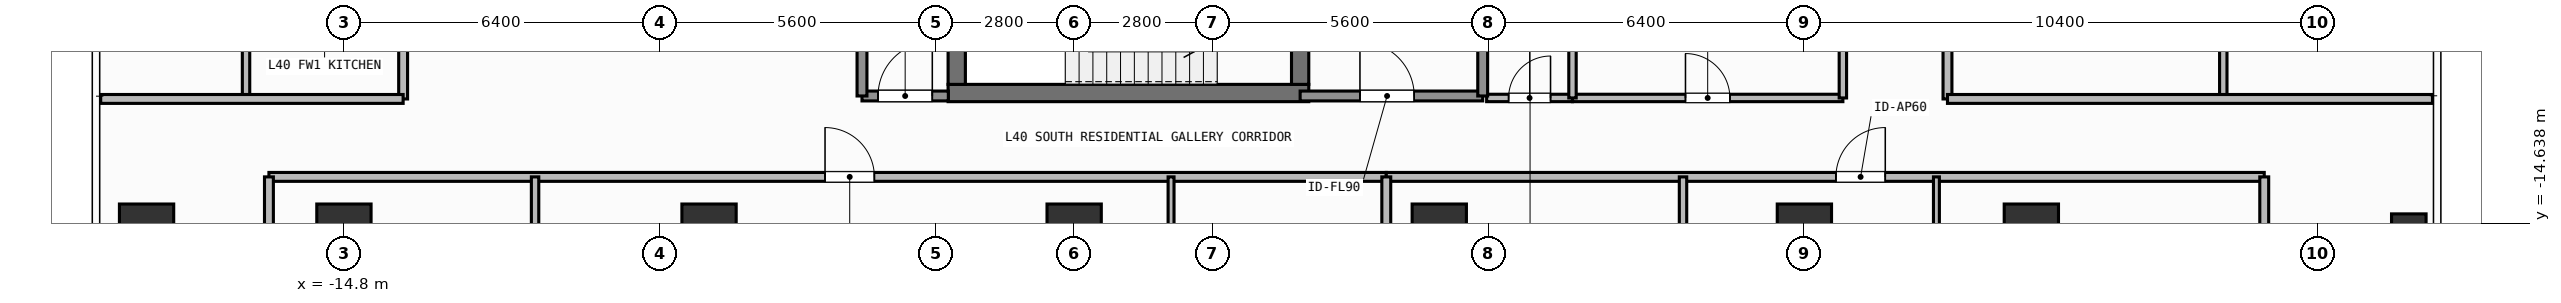
"""IFC4 building model, lengths in metres.
Left out: names, types, materials, properties, quantities, classifications, styles, units other than length and angle.
Written with IfcOpenShell. Run it as: python <this file> out.ifc"""

import sys

from ifc_helpers import new_model, si_unit, direction, frame, frame_2d, origin, origin_2d, place, context, subcontext, project, spatial, rectangle, hollow_rectangle, extrude, element, fill, save


model = new_model("IFC4")
c1 = context("Model", 3, precision=1e-05, world=origin(), true_north=direction((0.0, 1.0)))
c2 = subcontext(c1, "Body", "Model", "MODEL_VIEW")
j1 = project(units=[si_unit("LENGTHUNIT", "METRE"), si_unit("PLANEANGLEUNIT", "RADIAN")], contexts=[c1])
p1 = place(None, origin())
s1 = spatial("IfcSite", under=j1, at=p1, CompositionType="ELEMENT")
p2 = place(p1, origin())
s2 = spatial("IfcBuilding", under=s1, at=p2, CompositionType="ELEMENT")
p3 = place(p2, frame((0.0, 0.0, 164.1)))
s3 = spatial("IfcBuildingStorey", under=s2, at=p3, CompositionType="ELEMENT", Elevation=164.1)
p4 = place(p3, frame((-2.555, -12.0, 0.0), z_axis=(0.0, 0.0, 1.0), x_axis=(1.0, 0.0, 0.0)))
e1 = element("IfcWall", 1, at=p4, inside=s3, PredefinedType="SHEAR", context=c2, shape_type="SweptSolid", body=[
    extrude(rectangle(XDim=7.31, YDim=0.35, at=frame_2d((3.655, 0.0))), origin(), (0.0, 0.0, 1.0), 3.9),
])
p5 = place(p3, frame((-2.38, -11.825, 0.0), z_axis=(0.0, 0.0, 1.0), x_axis=(0.0, 1.0, 0.0)))
e2 = element("IfcWall", 2, at=p5, inside=s3, PredefinedType="SHEAR", context=c2, shape_type="SweptSolid", body=[
    extrude(rectangle(XDim=2.925, YDim=0.35, at=frame_2d((1.462, 0.0))), origin(), (0.0, 0.0, 1.0), 3.9),
])
p6 = place(p3, frame((4.58, -8.9, 0.0), z_axis=(0.0, 0.0, 1.0), x_axis=(0.0, -1.0, 0.0)))
e3 = element("IfcWall", 3, at=p6, inside=s3, PredefinedType="SHEAR", context=c2, shape_type="SweptSolid", body=[
    extrude(rectangle(XDim=2.925, YDim=0.35, at=frame_2d((1.462, 0.0))), origin(), (0.0, 0.0, 1.0), 3.9),
])
p7 = place(p6, frame((0.913, 0.0, 0.0)))
e4 = element("IfcOpeningElement", 4, at=p7, cuts=e3, PredefinedType="OPENING", context=c2, shape_type="SweptSolid", body=[
    extrude(rectangle(XDim=1.1, YDim=2.15, at=frame_2d((0.55, 1.075))), frame((0.0, 0.185, 0.0), z_axis=(0.0, -1.0, 0.0), x_axis=(1.0, 0.0, 0.0)), (0.0, 0.0, 1.0), 0.37),
])
for number, where, z_axis, x_axis in (
    (5, (-14.8, -14.8, 0.0), (0.0, 0.0, 1.0), (1.0, 0.0, 0.0)),
    (6, (-7.4, -14.8, 0.0), (0.0, 0.0, 1.0), (1.0, 0.0, 0.0)),
    (7, (0.0, -14.8, 0.0), (0.0, 0.0, 1.0), (1.0, 0.0, 0.0)),
    (8, (7.4, -14.8, 0.0), (0.0, 0.0, 1.0), (1.0, 0.0, 0.0)),
    (9, (14.8, -14.8, 0.0), (0.0, 0.0, 1.0), (1.0, 0.0, 0.0)),
    (10, (-18.8, -14.8, 0.0), (0.0, 0.0, 1.0), (1.0, 0.0, 0.0)),
    (11, (19.4, -14.8, 0.0), (0.0, 0.0, 1.0), (1.0, 0.0, 0.0)),
):
    element("IfcColumn", number, at=place(p3, frame(where, z_axis=z_axis, x_axis=x_axis)), inside=s3, PredefinedType="COLUMN", context=c2, shape_type="SweptSolid", body=[
        extrude(rectangle(XDim=1.1, YDim=1.1, at=origin_2d()), origin(), (0.0, 0.0, 1.0), 3.9),
    ])
p8 = place(p3, frame((27.05, -14.8, 0.0), z_axis=(0.0, 0.0, 1.0), x_axis=(1.0, 0.0, 0.0)))
e12 = element("IfcColumn", 12, at=p8, inside=s3, PredefinedType="COLUMN", context=c2, shape_type="SweptSolid", body=[
    extrude(hollow_rectangle(XDim=0.7, YDim=0.7, WallThickness=0.032, at=origin_2d()), origin(), (0.0, 0.0, 1.0), 3.9),
])
p9 = place(p3, frame((4.58, -12.06, 0.0), z_axis=(0.0, 0.0, 1.0), x_axis=(1.0, 0.0, 0.0)))
e13 = element("IfcWall", 13, at=p9, inside=s3, PredefinedType="SOLIDWALL", context=c2, shape_type="SweptSolid", body=[
    extrude(rectangle(XDim=3.7, YDim=0.2, at=frame_2d((1.85, 0.0))), origin(), (0.0, 0.0, 1.0), 3.62),
])
p10 = place(p9, frame((1.212, 0.0, 0.0)))
e14 = element("IfcOpeningElement", 14, at=p10, cuts=e13, PredefinedType="OPENING", context=c2, shape_type="SweptSolid", body=[
    extrude(rectangle(XDim=1.1, YDim=2.15, at=frame_2d((0.55, 1.075))), frame((0.0, 0.11, 0.0), z_axis=(0.0, -1.0, 0.0), x_axis=(1.0, 0.0, 0.0)), (0.0, 0.0, 1.0), 0.22),
])
p11 = place(p3, frame((-4.3, -12.06, 0.0), z_axis=(0.0, 0.0, 1.0), x_axis=(1.0, 0.0, 0.0)))
e15 = element("IfcWall", 15, at=p11, inside=s3, PredefinedType="SOLIDWALL", context=c2, shape_type="SweptSolid", body=[
    extrude(rectangle(XDim=1.75, YDim=0.2, at=frame_2d((0.875, 0.0))), origin(), (0.0, 0.0, 1.0), 3.62),
])
p12 = place(p11, frame((0.325, 0.0, 0.0)))
e16 = element("IfcOpeningElement", 16, at=p12, cuts=e15, PredefinedType="OPENING", context=c2, shape_type="SweptSolid", body=[
    extrude(rectangle(XDim=1.1, YDim=2.15, at=frame_2d((0.55, 1.075))), frame((0.0, 0.11, 0.0), z_axis=(0.0, -1.0, 0.0), x_axis=(1.0, 0.0, 0.0)), (0.0, 0.0, 1.0), 0.22),
])
p13 = place(p3, frame((8.36, -12.1, 0.0), z_axis=(0.0, 0.0, 1.0), x_axis=(1.0, 0.0, 0.0)))
e17 = element("IfcWall", 17, at=p13, inside=s3, PredefinedType="PARTITIONING", context=c2, shape_type="SweptSolid", body=[
    extrude(rectangle(XDim=1.74, YDim=0.15, at=frame_2d((0.87, 0.0))), origin(), (0.0, 0.0, 1.0), 3.62),
])
p14 = place(p13, frame((0.445, 0.0, 0.0)))
e18 = element("IfcOpeningElement", 18, at=p14, cuts=e17, PredefinedType="OPENING", context=c2, shape_type="SweptSolid", body=[
    extrude(rectangle(XDim=0.85, YDim=2.1, at=frame_2d((0.425, 1.05))), frame((0.0, 0.085, 0.0), z_axis=(0.0, -1.0, 0.0), x_axis=(1.0, 0.0, 0.0)), (0.0, 0.0, 1.0), 0.17),
])
p15 = place(p3, frame((10.1, -12.1, 0.0), z_axis=(0.0, 0.0, 1.0), x_axis=(1.0, 0.0, 0.0)))
e19 = element("IfcWall", 19, at=p15, inside=s3, PredefinedType="PARTITIONING", context=c2, shape_type="SweptSolid", body=[
    extrude(rectangle(XDim=5.48, YDim=0.15, at=frame_2d((2.74, 0.0))), origin(), (0.0, 0.0, 1.0), 3.62),
])
p16 = place(p15, frame((2.29, 0.0, 0.0)))
e20 = element("IfcOpeningElement", 20, at=p16, cuts=e19, PredefinedType="OPENING", context=c2, shape_type="SweptSolid", body=[
    extrude(rectangle(XDim=0.9, YDim=2.1, at=frame_2d((0.45, 1.05))), frame((0.0, 0.085, 0.0), z_axis=(0.0, -1.0, 0.0), x_axis=(1.0, 0.0, 0.0)), (0.0, 0.0, 1.0), 0.17),
])
p17 = place(p3, frame((-16.32, -13.7, 0.0), z_axis=(0.0, 0.0, 1.0), x_axis=(1.0, 0.0, 0.0)))
e21 = element("IfcWall", 21, at=p17, inside=s3, PredefinedType="PARTITIONING", context=c2, shape_type="SweptSolid", body=[
    extrude(rectangle(XDim=22.646, YDim=0.18, at=frame_2d((11.323, 0.0))), origin(), (0.0, 0.0, 1.0), 3.62),
])
p18 = place(p17, frame((11.271, 0.0, 0.0)))
e22 = element("IfcOpeningElement", 22, at=p18, cuts=e21, PredefinedType="OPENING", context=c2, shape_type="SweptSolid", body=[
    extrude(rectangle(XDim=1.0, YDim=2.2, at=frame_2d((0.5, 1.1))), frame((0.0, 0.1, 0.0), z_axis=(0.0, -1.0, 0.0), x_axis=(1.0, 0.0, 0.0)), (0.0, 0.0, 1.0), 0.2),
])
p19 = place(p3, frame((-10.926, -19.634, 0.0), z_axis=(0.0, 0.0, 1.0), x_axis=(0.0, 1.0, 0.0)))
e23 = element("IfcWall", 23, at=p19, inside=s3, PredefinedType="PARTITIONING", context=c2, shape_type="SweptSolid", body=[
    extrude(rectangle(XDim=5.934, YDim=0.15, at=frame_2d((2.967, 0.0))), origin(), (0.0, 0.0, 1.0), 3.31),
])
p20 = place(p19, frame((2.63, 0.0, 0.0)))
e24 = element("IfcOpeningElement", 24, at=p20, cuts=e23, PredefinedType="OPENING", context=c2, shape_type="SweptSolid", body=[
    extrude(rectangle(XDim=0.85, YDim=2.1, at=frame_2d((0.425, 1.05))), frame((0.0, 0.085, 0.0), z_axis=(0.0, -1.0, 0.0), x_axis=(1.0, 0.0, 0.0)), (0.0, 0.0, 1.0), 0.17),
])
p21 = place(p3, frame((1.964, -17.628, 0.0), z_axis=(0.0, 0.0, 1.0), x_axis=(0.0, 1.0, 0.0)))
e25 = element("IfcWall", 25, at=p21, inside=s3, PredefinedType="PARTITIONING", context=c2, shape_type="SweptSolid", body=[
    extrude(rectangle(XDim=3.928, YDim=0.12, at=frame_2d((1.964, 0.0))), origin(), (0.0, 0.0, 1.0), 3.62),
])
p22 = place(p21, frame((1.367, 0.0, 0.0)))
e26 = element("IfcOpeningElement", 26, at=p22, cuts=e25, PredefinedType="OPENING", context=c2, shape_type="SweptSolid", body=[
    extrude(rectangle(XDim=0.85, YDim=2.1, at=frame_2d((0.425, 1.05))), frame((0.0, 0.07, 0.0), z_axis=(0.0, -1.0, 0.0), x_axis=(1.0, 0.0, 0.0)), (0.0, 0.0, 1.0), 0.14),
])
p23 = place(p3, frame((6.326, -13.7, 0.0), z_axis=(0.0, 0.0, 1.0), x_axis=(1.0, 0.0, 0.0)))
e27 = element("IfcWall", 27, at=p23, inside=s3, PredefinedType="PARTITIONING", context=c2, shape_type="SweptSolid", body=[
    extrude(rectangle(XDim=17.794, YDim=0.18, at=frame_2d((8.897, 0.0))), origin(), (0.0, 0.0, 1.0), 3.62),
])
p24 = place(p23, frame((9.113, 0.0, 0.0)))
e28 = element("IfcOpeningElement", 28, at=p24, cuts=e27, PredefinedType="OPENING", context=c2, shape_type="SweptSolid", body=[
    extrude(rectangle(XDim=1.0, YDim=2.2, at=frame_2d((0.5, 1.1))), frame((0.0, 0.1, 0.0), z_axis=(0.0, -1.0, 0.0), x_axis=(1.0, 0.0, 0.0)), (0.0, 0.0, 1.0), 0.2),
])
p25 = place(p3, frame((12.34, -19.39, 0.0), z_axis=(0.0, 0.0, 1.0), x_axis=(0.0, 1.0, 0.0)))
e29 = element("IfcWall", 29, at=p25, inside=s3, PredefinedType="PARTITIONING", context=c2, shape_type="SweptSolid", body=[
    extrude(rectangle(XDim=5.69, YDim=0.15, at=frame_2d((2.845, 0.0))), origin(), (0.0, 0.0, 1.0), 3.62),
])
p26 = place(p25, frame((2.42, 0.0, 0.0)))
e30 = element("IfcOpeningElement", 30, at=p26, cuts=e29, PredefinedType="OPENING", context=c2, shape_type="SweptSolid", body=[
    extrude(rectangle(XDim=0.85, YDim=2.1, at=frame_2d((0.425, 1.05))), frame((0.0, 0.085, 0.0), z_axis=(0.0, -1.0, 0.0), x_axis=(1.0, 0.0, 0.0)), (0.0, 0.0, 1.0), 0.17),
])
p27 = place(p3, frame((17.476, -17.683, 0.0), z_axis=(0.0, 0.0, 1.0), x_axis=(0.0, 1.0, 0.0)))
e31 = element("IfcWall", 31, at=p27, inside=s3, PredefinedType="PARTITIONING", context=c2, shape_type="SweptSolid", body=[
    extrude(rectangle(XDim=3.983, YDim=0.12, at=frame_2d((1.992, 0.0))), origin(), (0.0, 0.0, 1.0), 3.62),
])
p28 = place(p27, frame((1.391, 0.0, 0.0)))
e32 = element("IfcOpeningElement", 32, at=p28, cuts=e31, PredefinedType="OPENING", context=c2, shape_type="SweptSolid", body=[
    extrude(rectangle(XDim=0.85, YDim=2.1, at=frame_2d((0.425, 1.05))), frame((0.0, 0.07, 0.0), z_axis=(0.0, -1.0, 0.0), x_axis=(1.0, 0.0, 0.0)), (0.0, 0.0, 1.0), 0.14),
])
p29 = place(p3, frame((-13.6, -12.12, 0.0), z_axis=(0.0, 0.0, 1.0), x_axis=(0.0, 1.0, 0.0)))
e33 = element("IfcWall", 33, at=p29, inside=s3, PredefinedType="PARTITIONING", context=c2, shape_type="SweptSolid", body=[
    extrude(rectangle(XDim=10.956, YDim=0.18, at=frame_2d((5.478, 0.0))), origin(), (0.0, 0.0, 1.0), 3.62),
])
p30 = place(p29, frame((5.335, 0.0, 0.0)))
e34 = element("IfcOpeningElement", 34, at=p30, cuts=e33, PredefinedType="OPENING", context=c2, shape_type="SweptSolid", body=[
    extrude(rectangle(XDim=1.0, YDim=2.2, at=frame_2d((0.5, 1.1))), frame((0.0, 0.1, 0.0), z_axis=(0.0, -1.0, 0.0), x_axis=(1.0, 0.0, 0.0)), (0.0, 0.0, 1.0), 0.2),
])
p31 = place(p3, frame((17.7, -12.12, 0.0), z_axis=(0.0, 0.0, 1.0), x_axis=(0.0, 1.0, 0.0)))
e35 = element("IfcWall", 35, at=p31, inside=s3, PredefinedType="PARTITIONING", context=c2, shape_type="SweptSolid", body=[
    extrude(rectangle(XDim=24.24, YDim=0.18, at=frame_2d((12.12, 0.0))), origin(), (0.0, 0.0, 1.0), 3.62),
])
p32 = place(p31, frame((11.62, 0.0, 0.0)))
e36 = element("IfcOpeningElement", 36, at=p32, cuts=e35, PredefinedType="OPENING", context=c2, shape_type="SweptSolid", body=[
    extrude(rectangle(XDim=1.0, YDim=2.2, at=frame_2d((0.5, 1.1))), frame((0.0, 0.1, 0.0), z_axis=(0.0, -1.0, 0.0), x_axis=(1.0, 0.0, 0.0)), (0.0, 0.0, 1.0), 0.2),
])
for number, where, z_axis, x_axis in (
    (37, (8.28, -12.06, 0.0), (0.0, 0.0, 1.0), (0.0, 1.0, 0.0)),
    (38, (-4.3, -12.06, 0.0), (0.0, 0.0, 1.0), (0.0, 1.0, 0.0)),
):
    element("IfcWall", number, at=place(p3, frame(where, z_axis=z_axis, x_axis=x_axis)), inside=s3, PredefinedType="SOLIDWALL", context=c2, shape_type="SweptSolid", body=[
        extrude(rectangle(XDim=3.26, YDim=0.2, at=frame_2d((1.63, 0.0))), origin(), (0.0, 0.0, 1.0), 3.62),
    ])
p33 = place(p3, frame((10.1, -12.1, 0.0), z_axis=(0.0, 0.0, 1.0), x_axis=(0.0, 1.0, 0.0)))
e39 = element("IfcWall", 39, at=p33, inside=s3, PredefinedType="PARTITIONING", context=c2, shape_type="SweptSolid", body=[
    extrude(rectangle(XDim=2.35, YDim=0.15, at=frame_2d((1.175, 0.0))), origin(), (0.0, 0.0, 1.0), 3.62),
])
p34 = place(p3, frame((15.58, -12.1, 0.0), z_axis=(0.0, 0.0, 1.0), x_axis=(0.0, 1.0, 0.0)))
e40 = element("IfcWall", 40, at=p34, inside=s3, PredefinedType="PARTITIONING", context=c2, shape_type="SweptSolid", body=[
    extrude(rectangle(XDim=6.25, YDim=0.15, at=frame_2d((3.125, 0.0))), origin(), (0.0, 0.0, 1.0), 3.62),
])
for number, where, z_axis, x_axis in (
    (41, (-16.32, -22.51, 0.0), (0.0, 0.0, 1.0), (0.0, 1.0, 0.0)),
    (42, (24.12, -22.51, 0.0), (0.0, 0.0, 1.0), (0.0, 1.0, 0.0)),
):
    element("IfcWall", number, at=place(p3, frame(where, z_axis=z_axis, x_axis=x_axis)), inside=s3, PredefinedType="PARTITIONING", context=c2, shape_type="SweptSolid", body=[
        extrude(rectangle(XDim=8.81, YDim=0.18, at=frame_2d((4.405, 0.0))), origin(), (0.0, 0.0, 1.0), 3.62),
    ])
p35 = place(p3, frame((6.326, -23.63, 0.0), z_axis=(0.0, 0.0, 1.0), x_axis=(0.0, 1.0, 0.0)))
e43 = element("IfcWall", 43, at=p35, inside=s3, PredefinedType="PARTITIONING", context=c2, shape_type="SweptSolid", body=[
    extrude(rectangle(XDim=9.93, YDim=0.18, at=frame_2d((4.965, 0.0))), origin(), (0.0, 0.0, 1.0), 3.62),
])
p36 = place(p3, frame((-16.784, -12.12, 0.0), z_axis=(0.0, 0.0, 1.0), x_axis=(0.0, 1.0, 0.0)))
e44 = element("IfcWall", 44, at=p36, inside=s3, PredefinedType="PARTITIONING", context=c2, shape_type="SweptSolid", body=[
    extrude(rectangle(XDim=3.726, YDim=0.15, at=frame_2d((1.863, 0.0))), origin(), (0.0, 0.0, 1.0), 3.62),
])
p37 = place(p3, frame((-19.73, -12.12, 0.0), z_axis=(0.0, 0.0, 1.0), x_axis=(1.0, 0.0, 0.0)))
e45 = element("IfcWall", 45, at=p37, inside=s3, PredefinedType="PARTITIONING", context=c2, shape_type="SweptSolid", body=[
    extrude(rectangle(XDim=6.13, YDim=0.18, at=frame_2d((3.065, 0.0))), origin(), (0.0, 0.0, 1.0), 3.62),
])
p38 = place(p3, frame((23.29, -12.12, 0.0), z_axis=(0.0, 0.0, 1.0), x_axis=(0.0, 1.0, 0.0)))
e46 = element("IfcWall", 46, at=p38, inside=s3, PredefinedType="PARTITIONING", context=c2, shape_type="SweptSolid", body=[
    extrude(rectangle(XDim=6.684, YDim=0.15, at=frame_2d((3.342, 0.0))), origin(), (0.0, 0.0, 1.0), 3.62),
])
p39 = place(p3, frame((17.7, -12.12, 0.0), z_axis=(0.0, 0.0, 1.0), x_axis=(1.0, 0.0, 0.0)))
e47 = element("IfcWall", 47, at=p39, inside=s3, PredefinedType="PARTITIONING", context=c2, shape_type="SweptSolid", body=[
    extrude(rectangle(XDim=9.83, YDim=0.18, at=frame_2d((4.915, 0.0))), origin(), (0.0, 0.0, 1.0), 3.62),
])
p40 = place(p10, origin())
e48 = element("IfcDoor", 48, at=p40, inside=s3, OperationType="SINGLE_SWING_LEFT", PredefinedType="DOOR", context=c2, shape_type="SweptSolid", body=[
    extrude(rectangle(XDim=1.1, YDim=2.15, at=frame_2d((0.55, 1.075))), frame((0.0, 0.025, 0.0), z_axis=(0.0, -1.0, 0.0), x_axis=(1.0, 0.0, 0.0)), (0.0, 0.0, 1.0), 0.05),
])
fill(e14, e48)
p41 = place(p12, origin())
e49 = element("IfcDoor", 49, at=p41, inside=s3, OperationType="SINGLE_SWING_RIGHT", PredefinedType="DOOR", context=c2, shape_type="SweptSolid", body=[
    extrude(rectangle(XDim=1.1, YDim=2.15, at=frame_2d((0.55, 1.075))), frame((0.0, 0.025, 0.0), z_axis=(0.0, -1.0, 0.0), x_axis=(1.0, 0.0, 0.0)), (0.0, 0.0, 1.0), 0.05),
])
fill(e16, e49)
p42 = place(p14, origin())
e50 = element("IfcDoor", 50, at=p42, inside=s3, OperationType="SINGLE_SWING_RIGHT", PredefinedType="DOOR", context=c2, shape_type="SweptSolid", body=[
    extrude(rectangle(XDim=0.85, YDim=2.1, at=frame_2d((0.425, 1.05))), frame((0.0, 0.025, 0.0), z_axis=(0.0, -1.0, 0.0), x_axis=(1.0, 0.0, 0.0)), (0.0, 0.0, 1.0), 0.05),
])
fill(e18, e50)
p43 = place(p16, origin())
e51 = element("IfcDoor", 51, at=p43, inside=s3, OperationType="SINGLE_SWING_LEFT", PredefinedType="DOOR", context=c2, shape_type="SweptSolid", body=[
    extrude(rectangle(XDim=0.9, YDim=2.1, at=frame_2d((0.45, 1.05))), frame((0.0, 0.025, 0.0), z_axis=(0.0, -1.0, 0.0), x_axis=(1.0, 0.0, 0.0)), (0.0, 0.0, 1.0), 0.05),
])
fill(e20, e51)
p44 = place(p18, origin())
e52 = element("IfcDoor", 52, at=p44, inside=s3, OperationType="SINGLE_SWING_LEFT", PredefinedType="DOOR", context=c2, shape_type="SweptSolid", body=[
    extrude(rectangle(XDim=1.0, YDim=2.2, at=frame_2d((0.5, 1.1))), frame((0.0, 0.025, 0.0), z_axis=(0.0, -1.0, 0.0), x_axis=(1.0, 0.0, 0.0)), (0.0, 0.0, 1.0), 0.05),
])
fill(e22, e52)
p45 = place(p24, origin())
e53 = element("IfcDoor", 53, at=p45, inside=s3, OperationType="SINGLE_SWING_RIGHT", PredefinedType="DOOR", context=c2, shape_type="SweptSolid", body=[
    extrude(rectangle(XDim=1.0, YDim=2.2, at=frame_2d((0.5, 1.1))), frame((0.0, 0.025, 0.0), z_axis=(0.0, -1.0, 0.0), x_axis=(1.0, 0.0, 0.0)), (0.0, 0.0, 1.0), 0.05),
])
fill(e28, e53)
save(model, sys.argv[1])
